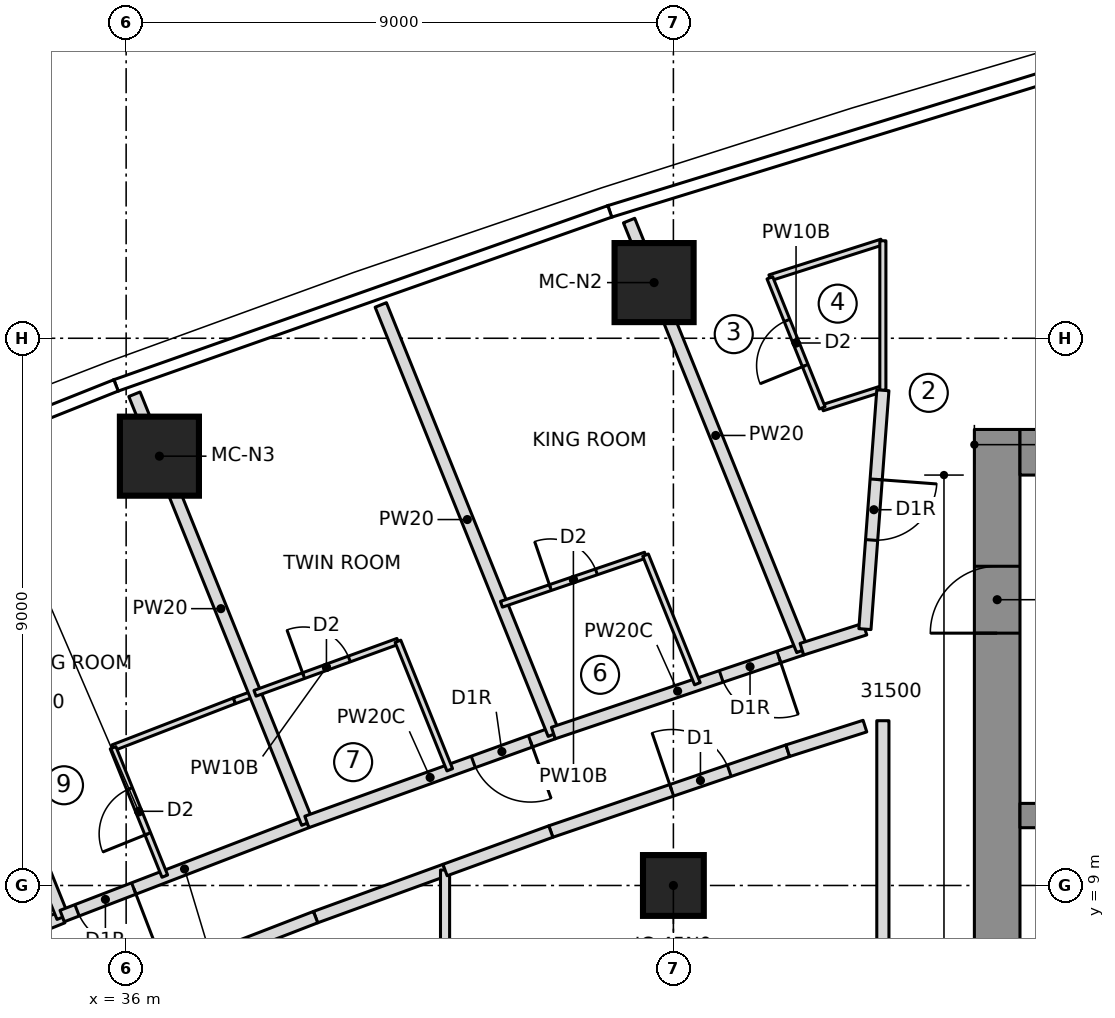
"""IFC4 building model, lengths in metres.
Left out: names, types, materials, properties, quantities, classifications, styles, units other than length and angle.
Written with IfcOpenShell. Run it as: python <this file> out.ifc"""

import sys

from ifc_helpers import new_model, si_unit, direction, frame, frame_2d, origin, origin_2d, place, context, subcontext, project, spatial, rectangle, extrude, element, fill, save


model = new_model("IFC4")
c1 = context("Model", 3, precision=1e-05, world=origin(), true_north=direction((0.0, 1.0)))
c2 = subcontext(c1, "Body", "Model", "MODEL_VIEW")
j1 = project(units=[si_unit("LENGTHUNIT", "METRE"), si_unit("PLANEANGLEUNIT", "RADIAN")], contexts=[c1])
p1 = place(None, origin())
s1 = spatial("IfcSite", under=j1, at=p1, CompositionType="ELEMENT")
p2 = place(p1, origin())
s2 = spatial("IfcBuilding", under=s1, at=p2, CompositionType="ELEMENT")
p3 = place(p2, frame((0.0, 0.0, 203.9)))
s3 = spatial("IfcBuildingStorey", under=s2, at=p3, CompositionType="ELEMENT", Elevation=203.9)
p4 = place(p3, frame((50.325, 6.65, 0.0), z_axis=(0.0, 0.0, 1.0), x_axis=(0.0, 1.0, 0.0)))
e1 = element("IfcWall", 1, at=p4, inside=s3, PredefinedType="SHEAR", context=c2, shape_type="SweptSolid", body=[
    extrude(rectangle(XDim=9.85, YDim=0.75, at=frame_2d((4.925, 0.0))), origin(), (0.0, 0.0, 1.0), 3.55),
])
p5 = place(p4, frame((6.5, 0.0, 0.0)))
e2 = element("IfcOpeningElement", 2, at=p5, cuts=e1, PredefinedType="OPENING", context=c2, shape_type="SweptSolid", body=[
    extrude(rectangle(XDim=1.1, YDim=2.1, at=frame_2d((0.55, 1.05))), frame((0.0, 0.385, 0.0), z_axis=(0.0, -1.0, 0.0), x_axis=(1.0, 0.0, 0.0)), (0.0, 0.0, 1.0), 0.77),
])
p6 = place(p3, frame((50.7, 16.125, 0.0), z_axis=(0.0, 0.0, 1.0), x_axis=(1.0, 0.0, 0.0)))
e3 = element("IfcWall", 3, at=p6, inside=s3, PredefinedType="SHEAR", context=c2, shape_type="SweptSolid", body=[
    extrude(rectangle(XDim=13.77, YDim=0.75, at=frame_2d((6.885, 0.0))), origin(), (0.0, 0.0, 1.0), 3.55),
])
p7 = place(p3, frame((50.7, 10.15, 0.0), z_axis=(0.0, 0.0, 1.0), x_axis=(1.0, 0.0, 0.0)))
e4 = element("IfcWall", 4, at=p7, inside=s3, PredefinedType="SHEAR", context=c2, shape_type="SweptSolid", body=[
    extrude(rectangle(XDim=13.02, YDim=0.4, at=frame_2d((6.51, 0.0))), origin(), (0.0, 0.0, 1.0), 3.55),
])
p8 = place(p7, frame((0.7, 0.0, 0.0)))
e5 = element("IfcOpeningElement", 5, at=p8, cuts=e4, PredefinedType="OPENING", context=c2, shape_type="SweptSolid", body=[
    extrude(rectangle(XDim=1.1, YDim=2.1, at=frame_2d((0.55, 1.05))), frame((0.0, 0.21, 0.0), z_axis=(0.0, -1.0, 0.0), x_axis=(1.0, 0.0, 0.0)), (0.0, 0.0, 1.0), 0.42),
])
p9 = place(p7, frame((3.5, 0.0, 0.0)))
e6 = element("IfcOpeningElement", 6, at=p9, cuts=e4, PredefinedType="OPENING", context=c2, shape_type="SweptSolid", body=[
    extrude(rectangle(XDim=1.1, YDim=2.1, at=frame_2d((0.55, 1.05))), frame((0.0, 0.21, 0.0), z_axis=(0.0, -1.0, 0.0), x_axis=(1.0, 0.0, 0.0)), (0.0, 0.0, 1.0), 0.42),
])
for number, where, z_axis, x_axis in (
    (7, (44.683, 18.916, 0.0), (0.0, 0.0, 1.0), (1.0, 0.0, 0.0)),
    (8, (36.547, 16.061, 0.0), (0.0, 0.0, 1.0), (1.0, 0.0, 0.0)),
):
    element("IfcColumn", number, at=place(p3, frame(where, z_axis=z_axis, x_axis=x_axis)), inside=s3, PredefinedType="COLUMN", context=c2, shape_type="SweptSolid", body=[
        extrude(rectangle(XDim=1.3, YDim=1.3, at=origin_2d()), origin(), (0.0, 0.0, 1.0), 3.55),
    ])
p10 = place(p3, frame((45.0, 9.0, 0.0), z_axis=(0.0, 0.0, 1.0), x_axis=(1.0, 0.0, 0.0)))
e9 = element("IfcColumn", 9, at=p10, inside=s3, PredefinedType="COLUMN", context=c2, shape_type="SweptSolid", body=[
    extrude(rectangle(XDim=1.0, YDim=1.0, at=origin_2d()), origin(), (0.0, 0.0, 1.0), 3.55),
])
p11 = place(p3, frame((30.958, 6.866, 0.0), z_axis=(0.0, 0.0, 1.0), x_axis=(0.927398695046, 0.374074404933, 0.0)))
e10 = element("IfcWall", 10, at=p11, inside=s3, PredefinedType="PARTITIONING", context=c2, shape_type="SweptSolid", body=[
    extrude(rectangle(XDim=4.311, YDim=0.2, at=frame_2d((2.155, 0.0))), origin(), (0.0, 0.0, 1.0), 3.25),
])
p12 = place(p11, frame((0.65, 0.0, 0.0)))
e11 = element("IfcOpeningElement", 11, at=p12, cuts=e10, PredefinedType="OPENING", context=c2, shape_type="SweptSolid", body=[
    extrude(rectangle(XDim=1.0, YDim=2.1, at=frame_2d((0.5, 1.05))), frame((0.0, 0.11, 0.0), z_axis=(0.0, -1.0, 0.0), x_axis=(1.0, 0.0, 0.0)), (0.0, 0.0, 1.0), 0.22),
])
p13 = place(p3, frame((34.956, 8.479, 0.0), z_axis=(0.0, 0.0, 1.0), x_axis=(-0.373881438439, 0.927476506436, 0.0)))
e12 = element("IfcWall", 12, at=p13, inside=s3, PredefinedType="PARTITIONING", context=c2, shape_type="SweptSolid", body=[
    extrude(rectangle(XDim=7.601, YDim=0.2, at=frame_2d((3.8, 0.0))), origin(), (0.0, 0.0, 1.0), 3.25),
])
p14 = place(p3, frame((38.972, 10.045, 0.0), z_axis=(0.0, 0.0, 1.0), x_axis=(-0.93335728106, -0.358948723208, 0.0)))
e13 = element("IfcWall", 13, at=p14, inside=s3, PredefinedType="PARTITIONING", context=c2, shape_type="SweptSolid", body=[
    extrude(rectangle(XDim=4.312, YDim=0.2, at=frame_2d((2.156, 0.0))), origin(), (0.0, 0.0, 1.0), 3.25),
])
p15 = place(p14, frame((3.05, 0.0, 0.0)))
e14 = element("IfcOpeningElement", 14, at=p15, cuts=e13, PredefinedType="OPENING", context=c2, shape_type="SweptSolid", body=[
    extrude(rectangle(XDim=1.0, YDim=2.1, at=frame_2d((0.5, 1.05))), frame((0.0, 0.11, 0.0), z_axis=(0.0, -1.0, 0.0), x_axis=(1.0, 0.0, 0.0)), (0.0, 0.0, 1.0), 0.22),
])
p16 = place(p3, frame((35.785, 11.266, 0.0), z_axis=(0.0, 0.0, 1.0), x_axis=(0.932673396793, 0.360721963448, 0.0)))
e15 = element("IfcWall", 15, at=p16, inside=s3, PredefinedType="PARTITIONING", context=c2, shape_type="SweptSolid", body=[
    extrude(rectangle(XDim=2.139, YDim=0.1, at=frame_2d((1.07, 0.0))), origin(), (0.0, 0.0, 1.0), 3.25),
])
p17 = place(p3, frame((37.78, 12.037, 0.0), z_axis=(0.0, 0.0, 1.0), x_axis=(0.939595761479, 0.34228614493, 0.0)))
e16 = element("IfcWall", 16, at=p17, inside=s3, PredefinedType="PARTITIONING", context=c2, shape_type="SweptSolid", body=[
    extrude(rectangle(XDim=0.361, YDim=0.1, at=frame_2d((0.18, 0.0))), origin(), (0.0, 0.0, 1.0), 3.25),
])
p18 = place(p3, frame((36.636, 9.154, 0.0), z_axis=(0.0, 0.0, 1.0), x_axis=(-0.373885031976, 0.927475057813, 0.0)))
e17 = element("IfcWall", 17, at=p18, inside=s3, PredefinedType="PARTITIONING", context=c2, shape_type="SweptSolid", body=[
    extrude(rectangle(XDim=2.277, YDim=0.1, at=frame_2d((1.138, 0.0))), origin(), (0.0, 0.0, 1.0), 3.25),
])
p19 = place(p18, frame((0.75, 0.0, 0.0)))
e18 = element("IfcOpeningElement", 18, at=p19, cuts=e17, PredefinedType="OPENING", context=c2, shape_type="SweptSolid", body=[
    extrude(rectangle(XDim=0.8, YDim=2.1, at=frame_2d((0.4, 1.05))), frame((0.0, 0.06, 0.0), z_axis=(0.0, -1.0, 0.0), x_axis=(1.0, 0.0, 0.0)), (0.0, 0.0, 1.0), 0.12),
])
p20 = place(p3, frame((38.98, 10.026, 0.0), z_axis=(0.0, 0.0, 1.0), x_axis=(-0.373863662938, 0.927483671843, 0.0)))
e19 = element("IfcWall", 19, at=p20, inside=s3, PredefinedType="PARTITIONING", context=c2, shape_type="SweptSolid", body=[
    extrude(rectangle(XDim=7.604, YDim=0.2, at=frame_2d((3.802, 0.0))), origin(), (0.0, 0.0, 1.0), 3.25),
])
p21 = place(p3, frame((43.026, 11.507, 0.0), z_axis=(0.0, 0.0, 1.0), x_axis=(-0.940653905433, -0.339367397069, 0.0)))
e20 = element("IfcWall", 20, at=p21, inside=s3, PredefinedType="PARTITIONING", context=c2, shape_type="SweptSolid", body=[
    extrude(rectangle(XDim=4.309, YDim=0.2, at=frame_2d((2.155, 0.0))), origin(), (0.0, 0.0, 1.0), 3.25),
])
p22 = place(p21, frame((0.4, 0.0, 0.0)))
e21 = element("IfcOpeningElement", 21, at=p22, cuts=e20, PredefinedType="OPENING", context=c2, shape_type="SweptSolid", body=[
    extrude(rectangle(XDim=1.0, YDim=2.1, at=frame_2d((0.5, 1.05))), frame((0.0, 0.11, 0.0), z_axis=(0.0, -1.0, 0.0), x_axis=(1.0, 0.0, 0.0)), (0.0, 0.0, 1.0), 0.22),
])
p23 = place(p3, frame((38.119, 12.161, 0.0), z_axis=(0.0, 0.0, 1.0), x_axis=(0.939744972593, 0.341876273652, 0.0)))
e22 = element("IfcWall", 22, at=p23, inside=s3, PredefinedType="PARTITIONING", context=c2, shape_type="SweptSolid", body=[
    extrude(rectangle(XDim=2.501, YDim=0.1, at=frame_2d((1.251, 0.0))), origin(), (0.0, 0.0, 1.0), 3.25),
])
p24 = place(p23, frame((0.85, 0.0, 0.0)))
e23 = element("IfcOpeningElement", 23, at=p24, cuts=e22, PredefinedType="OPENING", context=c2, shape_type="SweptSolid", body=[
    extrude(rectangle(XDim=0.8, YDim=2.1, at=frame_2d((0.4, 1.05))), frame((0.0, 0.06, 0.0), z_axis=(0.0, -1.0, 0.0), x_axis=(1.0, 0.0, 0.0)), (0.0, 0.0, 1.0), 0.12),
])
p25 = place(p3, frame((40.47, 13.016, 0.0), z_axis=(0.0, 0.0, 1.0), x_axis=(0.373846436826, -0.927490615409, 0.0)))
e24 = element("IfcWall", 24, at=p25, inside=s3, PredefinedType="PARTITIONING", context=c2, shape_type="SweptSolid", body=[
    extrude(rectangle(XDim=2.279, YDim=0.1, at=frame_2d((1.139, 0.0))), origin(), (0.0, 0.0, 1.0), 3.25),
])
p26 = place(p3, frame((43.033, 11.489, 0.0), z_axis=(0.0, 0.0, 1.0), x_axis=(-0.373877998371, 0.927477893178, 0.0)))
e25 = element("IfcWall", 25, at=p26, inside=s3, PredefinedType="PARTITIONING", context=c2, shape_type="SweptSolid", body=[
    extrude(rectangle(XDim=7.611, YDim=0.2, at=frame_2d((3.806, 0.0))), origin(), (0.0, 0.0, 1.0), 3.25),
])
p27 = place(p3, frame((47.113, 12.886, 0.0), z_axis=(0.0, 0.0, 1.0), x_axis=(-0.947550995841, -0.319604615549, 0.0)))
e26 = element("IfcWall", 26, at=p27, inside=s3, PredefinedType="PARTITIONING", context=c2, shape_type="SweptSolid", body=[
    extrude(rectangle(XDim=4.314, YDim=0.2, at=frame_2d((2.157, 0.0))), origin(), (0.0, 0.0, 1.0), 3.25),
])
p28 = place(p27, frame((0.4, 0.0, 0.0)))
e27 = element("IfcOpeningElement", 27, at=p28, cuts=e26, PredefinedType="OPENING", context=c2, shape_type="SweptSolid", body=[
    extrude(rectangle(XDim=1.0, YDim=2.1, at=frame_2d((0.5, 1.05))), frame((0.0, 0.11, 0.0), z_axis=(0.0, -1.0, 0.0), x_axis=(1.0, 0.0, 0.0)), (0.0, 0.0, 1.0), 0.22),
])
p29 = place(p3, frame((42.172, 13.625, 0.0), z_axis=(0.0, 0.0, 1.0), x_axis=(0.946406575113, 0.322977699822, 0.0)))
e28 = element("IfcWall", 28, at=p29, inside=s3, PredefinedType="PARTITIONING", context=c2, shape_type="SweptSolid", body=[
    extrude(rectangle(XDim=2.504, YDim=0.1, at=frame_2d((1.252, 0.0))), origin(), (0.0, 0.0, 1.0), 3.25),
])
p30 = place(p29, frame((0.85, 0.0, 0.0)))
e29 = element("IfcOpeningElement", 29, at=p30, cuts=e28, PredefinedType="OPENING", context=c2, shape_type="SweptSolid", body=[
    extrude(rectangle(XDim=0.8, YDim=2.1, at=frame_2d((0.4, 1.05))), frame((0.0, 0.06, 0.0), z_axis=(0.0, -1.0, 0.0), x_axis=(1.0, 0.0, 0.0)), (0.0, 0.0, 1.0), 0.12),
])
p31 = place(p3, frame((44.542, 14.434, 0.0), z_axis=(0.0, 0.0, 1.0), x_axis=(0.373917841166, -0.927461831052, 0.0)))
e30 = element("IfcWall", 30, at=p31, inside=s3, PredefinedType="PARTITIONING", context=c2, shape_type="SweptSolid", body=[
    extrude(rectangle(XDim=2.281, YDim=0.1, at=frame_2d((1.14, 0.0))), origin(), (0.0, 0.0, 1.0), 3.25),
])
p32 = place(p3, frame((47.121, 12.867, 0.0), z_axis=(0.0, 0.0, 1.0), x_axis=(-0.373907892596, 0.92746584188, 0.0)))
e31 = element("IfcWall", 31, at=p32, inside=s3, PredefinedType="PARTITIONING", context=c2, shape_type="SweptSolid", body=[
    extrude(rectangle(XDim=7.621, YDim=0.2, at=frame_2d((3.811, 0.0))), origin(), (0.0, 0.0, 1.0), 3.25),
])
p33 = place(p3, frame((46.586, 18.994, 0.0), z_axis=(0.0, 0.0, 1.0), x_axis=(0.952696570315, 0.303923090451, 0.0)))
e32 = element("IfcWall", 32, at=p33, inside=s3, PredefinedType="PARTITIONING", context=c2, shape_type="SweptSolid", body=[
    extrude(rectangle(XDim=1.933, YDim=0.1, at=frame_2d((0.966, 0.0))), origin(), (0.0, 0.0, 1.0), 3.25),
])
p34 = place(p3, frame((48.427, 17.167, 0.0), z_axis=(0.0, 0.0, 1.0), x_axis=(-0.952763220029, -0.303714086864, 0.0)))
e33 = element("IfcWall", 33, at=p34, inside=s3, PredefinedType="PARTITIONING", context=c2, shape_type="SweptSolid", body=[
    extrude(rectangle(XDim=1.027, YDim=0.1, at=frame_2d((0.513, 0.0))), origin(), (0.0, 0.0, 1.0), 3.25),
])
p35 = place(p3, frame((47.448, 16.855, 0.0), z_axis=(0.0, 0.0, 1.0), x_axis=(-0.373817051068, 0.927502459474, 0.0)))
e34 = element("IfcWall", 34, at=p35, inside=s3, PredefinedType="PARTITIONING", context=c2, shape_type="SweptSolid", body=[
    extrude(rectangle(XDim=2.306, YDim=0.1, at=frame_2d((1.153, 0.0))), origin(), (0.0, 0.0, 1.0), 3.25),
])
p36 = place(p35, frame((0.75, 0.0, 0.0)))
e35 = element("IfcOpeningElement", 35, at=p36, cuts=e34, PredefinedType="OPENING", context=c2, shape_type="SweptSolid", body=[
    extrude(rectangle(XDim=0.8, YDim=2.1, at=frame_2d((0.4, 1.05))), frame((0.0, 0.06, 0.0), z_axis=(0.0, -1.0, 0.0), x_axis=(1.0, 0.0, 0.0)), (0.0, 0.0, 1.0), 0.12),
])
p37 = place(p3, frame((39.115, 8.479, 0.0), z_axis=(0.0, 0.0, 1.0), x_axis=(0.939746227223, 0.341872824923, 0.0)))
e36 = element("IfcWall", 36, at=p37, inside=s3, PredefinedType="PARTITIONING", context=c2, shape_type="SweptSolid", body=[
    extrude(rectangle(XDim=2.266, YDim=0.2, at=frame_2d((1.133, 0.0))), origin(), (0.0, 0.0, 1.0), 3.25),
])
p38 = place(p3, frame((36.441, 7.445, 0.0), z_axis=(0.0, 0.0, 1.0), x_axis=(0.932650373077, 0.36078148733, 0.0)))
e37 = element("IfcWall", 37, at=p38, inside=s3, PredefinedType="PARTITIONING", context=c2, shape_type="SweptSolid", body=[
    extrude(rectangle(XDim=2.867, YDim=0.2, at=frame_2d((1.434, 0.0))), origin(), (0.0, 0.0, 1.0), 3.25),
])
p39 = place(p3, frame((41.245, -9.254, 0.0), z_axis=(0.0, 0.0, 1.0), x_axis=(0.0, 1.0, 0.0)))
e38 = element("IfcWall", 38, at=p39, inside=s3, PredefinedType="PARTITIONING", context=c2, shape_type="SweptSolid", body=[
    extrude(rectangle(XDim=18.508, YDim=0.15, at=frame_2d((9.254, 0.0))), origin(), (0.0, 0.0, 1.0), 3.25),
])
p40 = place(p3, frame((42.984, 9.887, 0.0), z_axis=(0.0, 0.0, 1.0), x_axis=(0.946436071896, 0.322891253852, 0.0)))
e39 = element("IfcWall", 39, at=p40, inside=s3, PredefinedType="PARTITIONING", context=c2, shape_type="SweptSolid", body=[
    extrude(rectangle(XDim=4.117, YDim=0.2, at=frame_2d((2.059, 0.0))), origin(), (0.0, 0.0, 1.0), 3.25),
])
p41 = place(p40, frame((2.1, 0.0, 0.0)))
e40 = element("IfcOpeningElement", 40, at=p41, cuts=e39, PredefinedType="OPENING", context=c2, shape_type="SweptSolid", body=[
    extrude(rectangle(XDim=1.0, YDim=2.1, at=frame_2d((0.5, 1.05))), frame((0.0, 0.11, 0.0), z_axis=(0.0, -1.0, 0.0), x_axis=(1.0, 0.0, 0.0)), (0.0, 0.0, 1.0), 0.22),
])
p42 = place(p3, frame((41.245, 9.254, 0.0), z_axis=(0.0, 0.0, 1.0), x_axis=(0.939704824537, 0.341986611933, 0.0)))
e41 = element("IfcWall", 41, at=p42, inside=s3, PredefinedType="PARTITIONING", context=c2, shape_type="SweptSolid", body=[
    extrude(rectangle(XDim=1.851, YDim=0.2, at=frame_2d((0.926, 0.0))), origin(), (0.0, 0.0, 1.0), 3.25),
])
p43 = place(p3, frame((48.445, 19.603, 0.0), z_axis=(0.0, 0.0, 1.0), x_axis=(0.0, -1.0, 0.0)))
e42 = element("IfcWall", 42, at=p43, inside=s3, PredefinedType="PARTITIONING", context=c2, shape_type="SweptSolid", body=[
    extrude(rectangle(XDim=2.459, YDim=0.1, at=frame_2d((1.229, 0.0))), origin(), (0.0, 0.0, 1.0), 3.25),
])
p44 = place(p3, frame((48.15, 13.217, 0.0), z_axis=(0.0, 0.0, 1.0), x_axis=(-0.952731090451, -0.303814860215, 0.0)))
e43 = element("IfcWall", 43, at=p44, inside=s3, PredefinedType="PARTITIONING", context=c2, shape_type="SweptSolid", body=[
    extrude(rectangle(XDim=1.088, YDim=0.2, at=frame_2d((0.544, 0.0))), origin(), (0.0, 0.0, 1.0), 3.25),
])
p45 = place(p3, frame((46.881, 11.217, 0.0), z_axis=(0.0, 0.0, 1.0), x_axis=(0.952761948983, 0.303718074157, 0.0)))
e44 = element("IfcWall", 44, at=p45, inside=s3, PredefinedType="PARTITIONING", context=c2, shape_type="SweptSolid", body=[
    extrude(rectangle(XDim=1.332, YDim=0.2, at=frame_2d((0.666, 0.0))), origin(), (0.0, 0.0, 1.0), 3.25),
])
p46 = place(p3, frame((48.445, 17.145, 0.0), z_axis=(0.0, 0.0, 1.0), x_axis=(-0.074933243819, -0.997188552366, 0.0)))
e45 = element("IfcWall", 45, at=p46, inside=s3, PredefinedType="PARTITIONING", context=c2, shape_type="SweptSolid", body=[
    extrude(rectangle(XDim=3.939, YDim=0.2, at=frame_2d((1.969, 0.0))), origin(), (0.0, 0.0, 1.0), 3.25),
])
p47 = place(p46, frame((1.47, 0.0, 0.0)))
e46 = element("IfcOpeningElement", 46, at=p47, cuts=e45, PredefinedType="OPENING", context=c2, shape_type="SweptSolid", body=[
    extrude(rectangle(XDim=1.0, YDim=2.1, at=frame_2d((0.5, 1.05))), frame((0.0, 0.11, 0.0), z_axis=(0.0, -1.0, 0.0), x_axis=(1.0, 0.0, 0.0)), (0.0, 0.0, 1.0), 0.22),
])
p48 = place(p3, frame((48.445, 11.71, 0.0), z_axis=(0.0, 0.0, 1.0), x_axis=(0.0, -1.0, 0.0)))
e47 = element("IfcWall", 47, at=p48, inside=s3, PredefinedType="PARTITIONING", context=c2, shape_type="SweptSolid", body=[
    extrude(rectangle(XDim=23.42, YDim=0.2, at=frame_2d((11.71, 0.0))), origin(), (0.0, 0.0, 1.0), 3.25),
])
p49 = place(p19, origin())
e48 = element("IfcDoor", 48, at=p49, inside=s3, OperationType="SINGLE_SWING_LEFT", PredefinedType="DOOR", context=c2, shape_type="SweptSolid", body=[
    extrude(rectangle(XDim=0.8, YDim=2.1, at=frame_2d((0.4, 1.05))), frame((0.0, 0.025, 0.0), z_axis=(0.0, -1.0, 0.0), x_axis=(1.0, 0.0, 0.0)), (0.0, 0.0, 1.0), 0.05),
])
fill(e18, e48)
p50 = place(p15, origin())
e49 = element("IfcDoor", 49, at=p50, inside=s3, OperationType="SINGLE_SWING_RIGHT", PredefinedType="DOOR", context=c2, shape_type="SweptSolid", body=[
    extrude(rectangle(XDim=1.0, YDim=2.1, at=frame_2d((0.5, 1.05))), frame((0.0, 0.025, 0.0), z_axis=(0.0, -1.0, 0.0), x_axis=(1.0, 0.0, 0.0)), (0.0, 0.0, 1.0), 0.05),
])
fill(e14, e49)
p51 = place(p24, origin())
e50 = element("IfcDoor", 50, at=p51, inside=s3, OperationType="SINGLE_SWING_LEFT", PredefinedType="DOOR", context=c2, shape_type="SweptSolid", body=[
    extrude(rectangle(XDim=0.8, YDim=2.1, at=frame_2d((0.4, 1.05))), frame((0.0, 0.025, 0.0), z_axis=(0.0, -1.0, 0.0), x_axis=(1.0, 0.0, 0.0)), (0.0, 0.0, 1.0), 0.05),
])
fill(e23, e50)
p52 = place(p22, origin())
e51 = element("IfcDoor", 51, at=p52, inside=s3, OperationType="SINGLE_SWING_RIGHT", PredefinedType="DOOR", context=c2, shape_type="SweptSolid", body=[
    extrude(rectangle(XDim=1.0, YDim=2.1, at=frame_2d((0.5, 1.05))), frame((0.0, 0.025, 0.0), z_axis=(0.0, -1.0, 0.0), x_axis=(1.0, 0.0, 0.0)), (0.0, 0.0, 1.0), 0.05),
])
fill(e21, e51)
p53 = place(p30, origin())
e52 = element("IfcDoor", 52, at=p53, inside=s3, OperationType="SINGLE_SWING_LEFT", PredefinedType="DOOR", context=c2, shape_type="SweptSolid", body=[
    extrude(rectangle(XDim=0.8, YDim=2.1, at=frame_2d((0.4, 1.05))), frame((0.0, 0.025, 0.0), z_axis=(0.0, -1.0, 0.0), x_axis=(1.0, 0.0, 0.0)), (0.0, 0.0, 1.0), 0.05),
])
fill(e29, e52)
p54 = place(p28, origin())
e53 = element("IfcDoor", 53, at=p54, inside=s3, OperationType="SINGLE_SWING_RIGHT", PredefinedType="DOOR", context=c2, shape_type="SweptSolid", body=[
    extrude(rectangle(XDim=1.0, YDim=2.1, at=frame_2d((0.5, 1.05))), frame((0.0, 0.025, 0.0), z_axis=(0.0, -1.0, 0.0), x_axis=(1.0, 0.0, 0.0)), (0.0, 0.0, 1.0), 0.05),
])
fill(e27, e53)
p55 = place(p36, origin())
e54 = element("IfcDoor", 54, at=p55, inside=s3, OperationType="SINGLE_SWING_LEFT", PredefinedType="DOOR", context=c2, shape_type="SweptSolid", body=[
    extrude(rectangle(XDim=0.8, YDim=2.1, at=frame_2d((0.4, 1.05))), frame((0.0, 0.025, 0.0), z_axis=(0.0, -1.0, 0.0), x_axis=(1.0, 0.0, 0.0)), (0.0, 0.0, 1.0), 0.05),
])
fill(e35, e54)
p56 = place(p41, origin())
e55 = element("IfcDoor", 55, at=p56, inside=s3, OperationType="SINGLE_SWING_LEFT", PredefinedType="DOOR", context=c2, shape_type="SweptSolid", body=[
    extrude(rectangle(XDim=1.0, YDim=2.1, at=frame_2d((0.5, 1.05))), frame((0.0, 0.025, 0.0), z_axis=(0.0, -1.0, 0.0), x_axis=(1.0, 0.0, 0.0)), (0.0, 0.0, 1.0), 0.05),
])
fill(e40, e55)
p57 = place(p47, origin())
e56 = element("IfcDoor", 56, at=p57, inside=s3, OperationType="SINGLE_SWING_RIGHT", PredefinedType="DOOR", context=c2, shape_type="SweptSolid", body=[
    extrude(rectangle(XDim=1.0, YDim=2.1, at=frame_2d((0.5, 1.05))), frame((0.0, 0.025, 0.0), z_axis=(0.0, -1.0, 0.0), x_axis=(1.0, 0.0, 0.0)), (0.0, 0.0, 1.0), 0.05),
])
fill(e46, e56)
p58 = place(p5, origin())
e57 = element("IfcDoor", 57, at=p58, inside=s3, OperationType="SINGLE_SWING_RIGHT", PredefinedType="DOOR", context=c2, shape_type="SweptSolid", body=[
    extrude(rectangle(XDim=1.1, YDim=2.1, at=frame_2d((0.55, 1.05))), frame((0.0, 0.025, 0.0), z_axis=(0.0, -1.0, 0.0), x_axis=(1.0, 0.0, 0.0)), (0.0, 0.0, 1.0), 0.05),
])
fill(e2, e57)
save(model, sys.argv[1])
